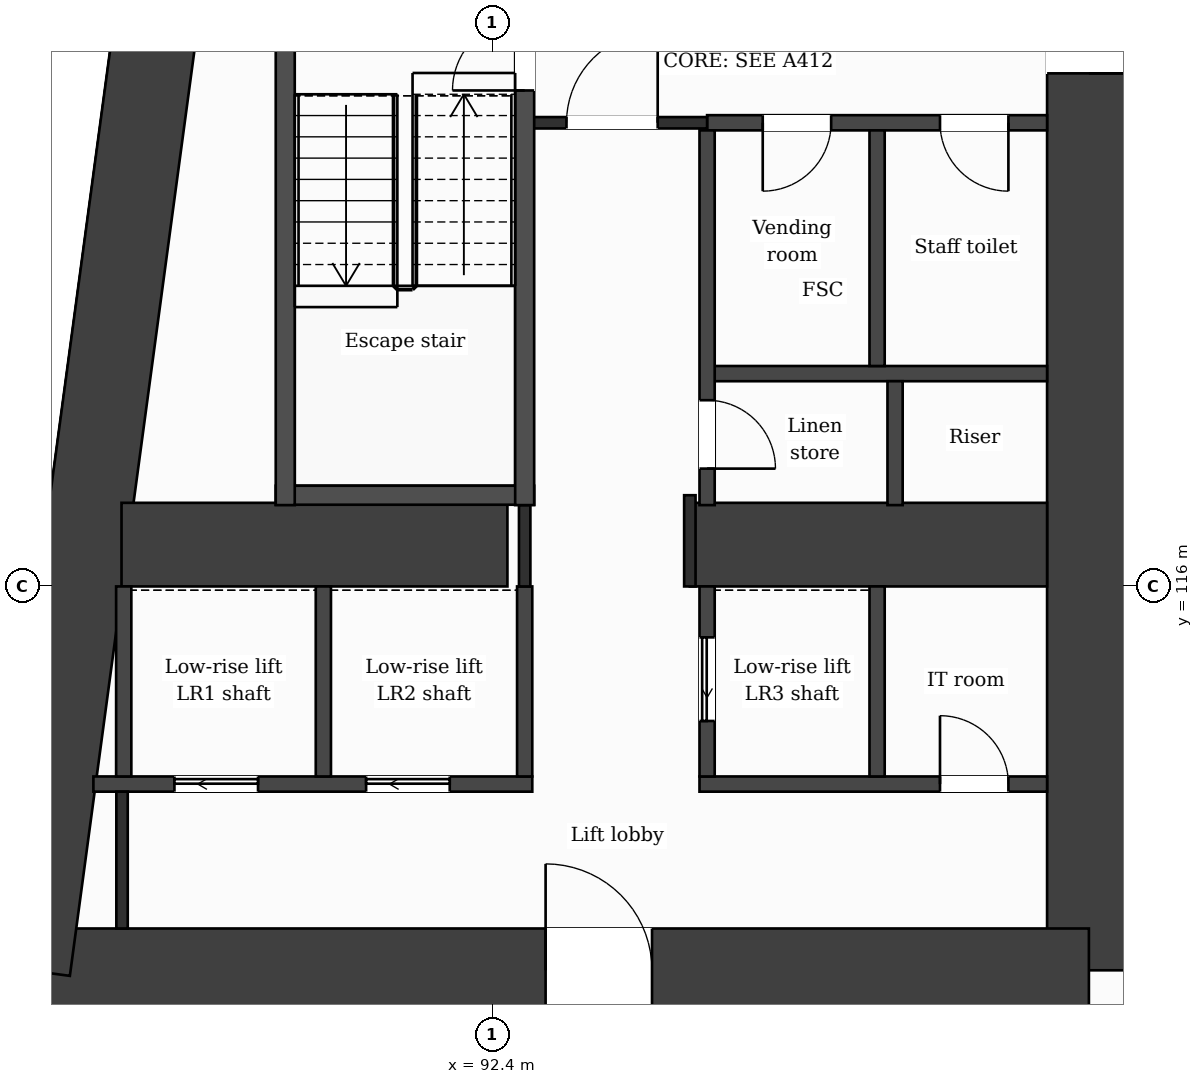
"""IFC4 building model, lengths in metres.
Left out: names, types, materials, properties, quantities, classifications, styles, units other than length and angle.
Written with IfcOpenShell. Run it as: python <this file> out.ifc"""

import sys

from ifc_helpers import new_model, si_unit, direction, frame, frame_2d, origin, place, context, subcontext, project, spatial, rectangle, extrude, element, fill, save


model = new_model("IFC4")
c1 = context("Model", 3, precision=1e-05, world=origin(), true_north=direction((0.0, 1.0)))
c2 = subcontext(c1, "Body", "Model", "MODEL_VIEW")
j1 = project(units=[si_unit("LENGTHUNIT", "METRE"), si_unit("PLANEANGLEUNIT", "RADIAN")], contexts=[c1])
p1 = place(None, origin())
s1 = spatial("IfcSite", under=j1, at=p1, CompositionType="ELEMENT")
p2 = place(p1, origin())
s2 = spatial("IfcBuilding", under=s1, at=p2, CompositionType="ELEMENT")
p3 = place(p2, frame((0.0, 0.0, 56.5)))
s3 = spatial("IfcBuildingStorey", under=s2, at=p3, CompositionType="ELEMENT", Elevation=56.5)
p4 = place(p3, frame((100.25, 131.85, 0.0), z_axis=(0.0, 0.0, 1.0), x_axis=(0.0, -1.0, 0.0)))
e1 = element("IfcWall", 1, at=p4, inside=s3, PredefinedType="SHEAR", context=c2, shape_type="SweptSolid", body=[
    extrude(rectangle(XDim=20.9, YDim=1.1, at=frame_2d((10.45, 0.0))), origin(), (0.0, 0.0, 1.0), 3.5),
])
p5 = place(p4, frame((7.7, 0.0, 0.0)))
e2 = element("IfcOpeningElement", 2, at=p5, cuts=e1, PredefinedType="OPENING", context=c2, shape_type="SweptSolid", body=[
    extrude(rectangle(XDim=1.4, YDim=2.1, at=frame_2d((0.7, 1.05))), frame((0.0, 0.56, 0.0), z_axis=(0.0, -1.0, 0.0), x_axis=(1.0, 0.0, 0.0)), (0.0, 0.0, 1.0), 1.12),
])
p6 = place(p3, frame((100.25, 110.95, 0.0), z_axis=(0.0, 0.0, 1.0), x_axis=(-1.0, 0.0, 0.0)))
e3 = element("IfcWall", 3, at=p6, inside=s3, PredefinedType="SHEAR", context=c2, shape_type="SweptSolid", body=[
    extrude(rectangle(XDim=13.952, YDim=1.1, at=frame_2d((6.976, 0.0))), origin(), (0.0, 0.0, 1.0), 3.5),
])
p7 = place(p6, frame((5.748, 0.0, 0.0)))
e4 = element("IfcOpeningElement", 4, at=p7, cuts=e3, PredefinedType="OPENING", context=c2, shape_type="SweptSolid", body=[
    extrude(rectangle(XDim=1.4, YDim=2.1, at=frame_2d((0.7, 1.05))), frame((0.0, 0.56, 0.0), z_axis=(0.0, -1.0, 0.0), x_axis=(1.0, 0.0, 0.0)), (0.0, 0.0, 1.0), 1.12),
])
p8 = place(p3, frame((86.298, 110.95, 0.0), z_axis=(0.0, 0.0, 1.0), x_axis=(0.133400422634, 0.99106222168, 0.0)))
e5 = element("IfcWall", 5, at=p8, inside=s3, PredefinedType="SHEAR", context=c2, shape_type="SweptSolid", body=[
    extrude(rectangle(XDim=21.089, YDim=1.1, at=frame_2d((10.544, 0.0))), origin(), (0.0, 0.0, 1.0), 3.5),
])
p9 = place(p3, frame((87.523, 116.55, 0.0), z_axis=(0.0, 0.0, 1.0), x_axis=(1.0, 0.0, 0.0)))
e6 = element("IfcWall", 6, at=p9, inside=s3, PredefinedType="SHEAR", context=c2, shape_type="SweptSolid", body=[
    extrude(rectangle(XDim=5.077, YDim=1.1, at=frame_2d((2.539, 0.0))), origin(), (0.0, 0.0, 1.0), 3.5),
])
p10 = place(p3, frame((95.0, 116.55, 0.0), z_axis=(0.0, 0.0, 1.0), x_axis=(1.0, 0.0, 0.0)))
e7 = element("IfcWall", 7, at=p10, inside=s3, PredefinedType="SHEAR", context=c2, shape_type="SweptSolid", body=[
    extrude(rectangle(XDim=4.7, YDim=1.1, at=frame_2d((2.35, 0.0))), origin(), (0.0, 0.0, 1.0), 3.5),
])
p11 = place(p3, frame((87.153, 113.4, 0.0), z_axis=(0.0, 0.0, 1.0), x_axis=(1.0, 0.0, 0.0)))
e8 = element("IfcWall", 8, at=p11, inside=s3, PredefinedType="PARTITIONING", context=c2, shape_type="SweptSolid", body=[
    extrude(rectangle(XDim=5.774, YDim=0.2, at=frame_2d((2.887, 0.0))), origin(), (0.0, 0.0, 1.0), 3.18),
])
p12 = place(p11, frame((1.066, 0.0, 0.0)))
e9 = element("IfcOpeningElement", 9, at=p12, cuts=e8, PredefinedType="OPENING", context=c2, shape_type="SweptSolid", body=[
    extrude(rectangle(XDim=1.1, YDim=2.1, at=frame_2d((0.55, 1.05))), frame((0.0, 0.11, 0.0), z_axis=(0.0, -1.0, 0.0), x_axis=(1.0, 0.0, 0.0)), (0.0, 0.0, 1.0), 0.22),
])
p13 = place(p11, frame((3.588, 0.0, 0.0)))
e10 = element("IfcOpeningElement", 10, at=p13, cuts=e8, PredefinedType="OPENING", context=c2, shape_type="SweptSolid", body=[
    extrude(rectangle(XDim=1.1, YDim=2.1, at=frame_2d((0.55, 1.05))), frame((0.0, 0.11, 0.0), z_axis=(0.0, -1.0, 0.0), x_axis=(1.0, 0.0, 0.0)), (0.0, 0.0, 1.0), 0.22),
])
p14 = place(p3, frame((95.127, 113.4, 0.0), z_axis=(0.0, 0.0, 1.0), x_axis=(1.0, 0.0, 0.0)))
e11 = element("IfcWall", 11, at=p14, inside=s3, PredefinedType="PARTITIONING", context=c2, shape_type="SweptSolid", body=[
    extrude(rectangle(XDim=4.573, YDim=0.2, at=frame_2d((2.287, 0.0))), origin(), (0.0, 0.0, 1.0), 3.18),
])
p15 = place(p14, frame((3.164, 0.0, 0.0)))
e12 = element("IfcOpeningElement", 12, at=p15, cuts=e11, PredefinedType="OPENING", context=c2, shape_type="SweptSolid", body=[
    extrude(rectangle(XDim=0.9, YDim=2.1, at=frame_2d((0.45, 1.05))), frame((0.0, 0.11, 0.0), z_axis=(0.0, -1.0, 0.0), x_axis=(1.0, 0.0, 0.0)), (0.0, 0.0, 1.0), 0.22),
])
p16 = place(p3, frame((89.552, 117.2, 0.0), z_axis=(0.0, 0.0, 1.0), x_axis=(1.0, 0.0, 0.0)))
e13 = element("IfcWall", 13, at=p16, inside=s3, PredefinedType="PARTITIONING", context=c2, shape_type="SweptSolid", body=[
    extrude(rectangle(XDim=3.4, YDim=0.25, at=frame_2d((1.7, 0.0))), origin(), (0.0, 0.0, 1.0), 3.18),
])
p17 = place(p3, frame((95.227, 118.8, 0.0), z_axis=(0.0, 0.0, 1.0), x_axis=(1.0, 0.0, 0.0)))
e14 = element("IfcWall", 14, at=p17, inside=s3, PredefinedType="PARTITIONING", context=c2, shape_type="SweptSolid", body=[
    extrude(rectangle(XDim=4.473, YDim=0.2, at=frame_2d((2.236, 0.0))), origin(), (0.0, 0.0, 1.0), 3.18),
])
p18 = place(p3, frame((95.227, 122.1, 0.0), z_axis=(0.0, 0.0, 1.0), x_axis=(1.0, 0.0, 0.0)))
e15 = element("IfcWall", 15, at=p18, inside=s3, PredefinedType="PARTITIONING", context=c2, shape_type="SweptSolid", body=[
    extrude(rectangle(XDim=4.473, YDim=0.2, at=frame_2d((2.236, 0.0))), origin(), (0.0, 0.0, 1.0), 3.18),
])
p19 = place(p18, frame((0.732, 0.0, 0.0)))
e16 = element("IfcOpeningElement", 16, at=p19, cuts=e15, PredefinedType="OPENING", context=c2, shape_type="SweptSolid", body=[
    extrude(rectangle(XDim=0.9, YDim=2.1, at=frame_2d((0.45, 1.05))), frame((0.0, 0.11, 0.0), z_axis=(0.0, -1.0, 0.0), x_axis=(1.0, 0.0, 0.0)), (0.0, 0.0, 1.0), 0.22),
])
p20 = place(p18, frame((3.064, 0.0, 0.0)))
e17 = element("IfcOpeningElement", 17, at=p20, cuts=e15, PredefinedType="OPENING", context=c2, shape_type="SweptSolid", body=[
    extrude(rectangle(XDim=0.9, YDim=2.1, at=frame_2d((0.45, 1.05))), frame((0.0, 0.11, 0.0), z_axis=(0.0, -1.0, 0.0), x_axis=(1.0, 0.0, 0.0)), (0.0, 0.0, 1.0), 0.22),
])
p21 = place(p3, frame((92.827, 122.1, 0.0), z_axis=(0.0, 0.0, 1.0), x_axis=(1.0, 0.0, 0.0)))
e18 = element("IfcWall", 18, at=p21, inside=s3, PredefinedType="PARTITIONING", context=c2, shape_type="SweptSolid", body=[
    extrude(rectangle(XDim=2.4, YDim=0.15, at=frame_2d((1.2, 0.0))), origin(), (0.0, 0.0, 1.0), 3.18),
])
p22 = place(p21, frame((0.55, 0.0, 0.0)))
e19 = element("IfcOpeningElement", 19, at=p22, cuts=e18, PredefinedType="OPENING", context=c2, shape_type="SweptSolid", body=[
    extrude(rectangle(XDim=1.2, YDim=2.1, at=frame_2d((0.6, 1.05))), frame((0.0, 0.085, 0.0), z_axis=(0.0, -1.0, 0.0), x_axis=(1.0, 0.0, 0.0)), (0.0, 0.0, 1.0), 0.17),
])
p23 = place(p3, frame((87.552, 113.5, 0.0), z_axis=(0.0, 0.0, 1.0), x_axis=(0.0, 1.0, 0.0)))
e20 = element("IfcWall", 20, at=p23, inside=s3, PredefinedType="PARTITIONING", context=c2, shape_type="SweptSolid", body=[
    extrude(rectangle(XDim=2.5, YDim=0.2, at=frame_2d((1.25, 0.0))), origin(), (0.0, 0.0, 1.0), 3.18),
])
p24 = place(p3, frame((87.53, 111.5, 0.0), z_axis=(0.0, 0.0, 1.0), x_axis=(0.0, 1.0, 0.0)))
e21 = element("IfcWall", 21, at=p24, inside=s3, PredefinedType="PARTITIONING", context=c2, shape_type="SweptSolid", body=[
    extrude(rectangle(XDim=1.8, YDim=0.15, at=frame_2d((0.9, 0.0))), origin(), (0.0, 0.0, 1.0), 3.18),
])
p25 = place(p3, frame((89.677, 117.07, 0.0), z_axis=(0.0, 0.0, 1.0), x_axis=(0.0, 1.0, 0.0)))
e22 = element("IfcWall", 22, at=p25, inside=s3, PredefinedType="PARTITIONING", context=c2, shape_type="SweptSolid", body=[
    extrude(rectangle(XDim=6.755, YDim=0.25, at=frame_2d((3.377, 0.0))), origin(), (0.0, 0.0, 1.0), 3.18),
])
for number, where, z_axis, x_axis in (
    (23, (90.178, 113.5, 0.0), (0.0, 0.0, 1.0), (0.0, 1.0, 0.0)),
    (24, (92.827, 113.5, 0.0), (0.0, 0.0, 1.0), (0.0, 1.0, 0.0)),
):
    element("IfcWall", number, at=place(p3, frame(where, z_axis=z_axis, x_axis=x_axis)), inside=s3, PredefinedType="PARTITIONING", context=c2, shape_type="SweptSolid", body=[
        extrude(rectangle(XDim=2.5, YDim=0.2, at=frame_2d((1.25, 0.0))), origin(), (0.0, 0.0, 1.0), 3.18),
    ])
p26 = place(p3, frame((92.827, 116.0, 0.0), z_axis=(0.0, 0.0, 1.0), x_axis=(0.0, 1.0, 0.0)))
e25 = element("IfcWall", 25, at=p26, inside=s3, PredefinedType="PARTITIONING", context=c2, shape_type="SweptSolid", body=[
    extrude(rectangle(XDim=1.07, YDim=0.15, at=frame_2d((0.535, 0.0))), origin(), (0.0, 0.0, 1.0), 3.18),
])
p27 = place(p3, frame((92.827, 117.07, 0.0), z_axis=(0.0, 0.0, 1.0), x_axis=(0.0, 1.0, 0.0)))
e26 = element("IfcWall", 26, at=p27, inside=s3, PredefinedType="PARTITIONING", context=c2, shape_type="SweptSolid", body=[
    extrude(rectangle(XDim=6.755, YDim=0.25, at=frame_2d((3.377, 0.0))), origin(), (0.0, 0.0, 1.0), 3.18),
])
p28 = place(p27, frame((5.455, 0.0, 0.0)))
e27 = element("IfcOpeningElement", 27, at=p28, cuts=e26, PredefinedType="OPENING", context=c2, shape_type="SweptSolid", body=[
    extrude(rectangle(XDim=0.95, YDim=2.1, at=frame_2d((0.475, 1.05))), frame((0.0, 0.135, 0.0), z_axis=(0.0, -1.0, 0.0), x_axis=(1.0, 0.0, 0.0)), (0.0, 0.0, 1.0), 0.27),
])
p29 = place(p3, frame((95.0, 116.0, 0.0), z_axis=(0.0, 0.0, 1.0), x_axis=(0.0, 1.0, 0.0)))
e28 = element("IfcWall", 28, at=p29, inside=s3, PredefinedType="PARTITIONING", context=c2, shape_type="SweptSolid", body=[
    extrude(rectangle(XDim=1.2, YDim=0.15, at=frame_2d((0.6, 0.0))), origin(), (0.0, 0.0, 1.0), 3.18),
])
p30 = place(p3, frame((95.227, 113.5, 0.0), z_axis=(0.0, 0.0, 1.0), x_axis=(0.0, 1.0, 0.0)))
e29 = element("IfcWall", 29, at=p30, inside=s3, PredefinedType="PARTITIONING", context=c2, shape_type="SweptSolid", body=[
    extrude(rectangle(XDim=2.5, YDim=0.2, at=frame_2d((1.25, 0.0))), origin(), (0.0, 0.0, 1.0), 3.18),
])
p31 = place(p30, frame((0.73, 0.0, 0.0)))
e30 = element("IfcOpeningElement", 30, at=p31, cuts=e29, PredefinedType="OPENING", context=c2, shape_type="SweptSolid", body=[
    extrude(rectangle(XDim=1.1, YDim=2.1, at=frame_2d((0.55, 1.05))), frame((0.0, 0.11, 0.0), z_axis=(0.0, -1.0, 0.0), x_axis=(1.0, 0.0, 0.0)), (0.0, 0.0, 1.0), 0.22),
])
p32 = place(p3, frame((95.227, 117.07, 0.0), z_axis=(0.0, 0.0, 1.0), x_axis=(0.0, 1.0, 0.0)))
e31 = element("IfcWall", 31, at=p32, inside=s3, PredefinedType="PARTITIONING", context=c2, shape_type="SweptSolid", body=[
    extrude(rectangle(XDim=4.93, YDim=0.2, at=frame_2d((2.465, 0.0))), origin(), (0.0, 0.0, 1.0), 3.18),
])
p33 = place(p32, frame((0.48, 0.0, 0.0)))
e32 = element("IfcOpeningElement", 32, at=p33, cuts=e31, PredefinedType="OPENING", context=c2, shape_type="SweptSolid", body=[
    extrude(rectangle(XDim=0.9, YDim=2.1, at=frame_2d((0.45, 1.05))), frame((0.0, 0.11, 0.0), z_axis=(0.0, -1.0, 0.0), x_axis=(1.0, 0.0, 0.0)), (0.0, 0.0, 1.0), 0.22),
])
p34 = place(p3, frame((97.463, 113.5, 0.0), z_axis=(0.0, 0.0, 1.0), x_axis=(0.0, 1.0, 0.0)))
e33 = element("IfcWall", 33, at=p34, inside=s3, PredefinedType="PARTITIONING", context=c2, shape_type="SweptSolid", body=[
    extrude(rectangle(XDim=2.5, YDim=0.2, at=frame_2d((1.25, 0.0))), origin(), (0.0, 0.0, 1.0), 3.18),
])
p35 = place(p3, frame((97.463, 118.9, 0.0), z_axis=(0.0, 0.0, 1.0), x_axis=(0.0, 1.0, 0.0)))
e34 = element("IfcWall", 34, at=p35, inside=s3, PredefinedType="PARTITIONING", context=c2, shape_type="SweptSolid", body=[
    extrude(rectangle(XDim=3.1, YDim=0.2, at=frame_2d((1.55, 0.0))), origin(), (0.0, 0.0, 1.0), 3.18),
])
p36 = place(p3, frame((97.7, 117.07, 0.0), z_axis=(0.0, 0.0, 1.0), x_axis=(0.0, 1.0, 0.0)))
e35 = element("IfcWall", 35, at=p36, inside=s3, PredefinedType="PARTITIONING", context=c2, shape_type="SweptSolid", body=[
    extrude(rectangle(XDim=1.63, YDim=0.2, at=frame_2d((0.815, 0.0))), origin(), (0.0, 0.0, 1.0), 3.18),
])
p37 = place(p22, origin())
e36 = element("IfcDoor", 36, at=p37, inside=s3, OperationType="SINGLE_SWING_RIGHT", PredefinedType="DOOR", context=c2, shape_type="SweptSolid", body=[
    extrude(rectangle(XDim=1.2, YDim=2.1, at=frame_2d((0.6, 1.05))), frame((0.0, 0.025, 0.0), z_axis=(0.0, -1.0, 0.0), x_axis=(1.0, 0.0, 0.0)), (0.0, 0.0, 1.0), 0.05),
])
fill(e19, e36)
p38 = place(p19, origin())
e37 = element("IfcDoor", 37, at=p38, inside=s3, OperationType="SINGLE_SWING_LEFT", PredefinedType="DOOR", context=c2, shape_type="SweptSolid", body=[
    extrude(rectangle(XDim=0.9, YDim=2.1, at=frame_2d((0.45, 1.05))), frame((0.0, 0.025, 0.0), z_axis=(0.0, -1.0, 0.0), x_axis=(1.0, 0.0, 0.0)), (0.0, 0.0, 1.0), 0.05),
])
fill(e16, e37)
p39 = place(p20, origin())
e38 = element("IfcDoor", 38, at=p39, inside=s3, OperationType="SINGLE_SWING_RIGHT", PredefinedType="DOOR", context=c2, shape_type="SweptSolid", body=[
    extrude(rectangle(XDim=0.9, YDim=2.1, at=frame_2d((0.45, 1.05))), frame((0.0, 0.025, 0.0), z_axis=(0.0, -1.0, 0.0), x_axis=(1.0, 0.0, 0.0)), (0.0, 0.0, 1.0), 0.05),
])
fill(e17, e38)
p40 = place(p28, origin())
e39 = element("IfcDoor", 39, at=p40, inside=s3, OperationType="SINGLE_SWING_LEFT", PredefinedType="DOOR", context=c2, shape_type="SweptSolid", body=[
    extrude(rectangle(XDim=0.95, YDim=2.1, at=frame_2d((0.475, 1.05))), frame((0.0, 0.025, 0.0), z_axis=(0.0, -1.0, 0.0), x_axis=(1.0, 0.0, 0.0)), (0.0, 0.0, 1.0), 0.05),
])
fill(e27, e39)
p41 = place(p33, origin())
e40 = element("IfcDoor", 40, at=p41, inside=s3, OperationType="SINGLE_SWING_LEFT", PredefinedType="DOOR", context=c2, shape_type="SweptSolid", body=[
    extrude(rectangle(XDim=0.9, YDim=2.1, at=frame_2d((0.45, 1.05))), frame((0.0, 0.025, 0.0), z_axis=(0.0, -1.0, 0.0), x_axis=(1.0, 0.0, 0.0)), (0.0, 0.0, 1.0), 0.05),
])
fill(e32, e40)
p42 = place(p12, origin())
e41 = element("IfcDoor", 41, at=p42, inside=s3, OperationType="SLIDING_TO_LEFT", PredefinedType="DOOR", context=c2, shape_type="SweptSolid", body=[
    extrude(rectangle(XDim=1.1, YDim=2.1, at=frame_2d((0.55, 1.05))), frame((0.0, 0.025, 0.0), z_axis=(0.0, -1.0, 0.0), x_axis=(1.0, 0.0, 0.0)), (0.0, 0.0, 1.0), 0.05),
])
fill(e9, e41)
p43 = place(p13, origin())
e42 = element("IfcDoor", 42, at=p43, inside=s3, OperationType="SLIDING_TO_LEFT", PredefinedType="DOOR", context=c2, shape_type="SweptSolid", body=[
    extrude(rectangle(XDim=1.1, YDim=2.1, at=frame_2d((0.55, 1.05))), frame((0.0, 0.025, 0.0), z_axis=(0.0, -1.0, 0.0), x_axis=(1.0, 0.0, 0.0)), (0.0, 0.0, 1.0), 0.05),
])
fill(e10, e42)
p44 = place(p31, origin())
e43 = element("IfcDoor", 43, at=p44, inside=s3, OperationType="SLIDING_TO_LEFT", PredefinedType="DOOR", context=c2, shape_type="SweptSolid", body=[
    extrude(rectangle(XDim=1.1, YDim=2.1, at=frame_2d((0.55, 1.05))), frame((0.0, 0.025, 0.0), z_axis=(0.0, -1.0, 0.0), x_axis=(1.0, 0.0, 0.0)), (0.0, 0.0, 1.0), 0.05),
])
fill(e30, e43)
p45 = place(p15, origin())
e44 = element("IfcDoor", 44, at=p45, inside=s3, OperationType="SINGLE_SWING_LEFT", PredefinedType="DOOR", context=c2, shape_type="SweptSolid", body=[
    extrude(rectangle(XDim=0.9, YDim=2.1, at=frame_2d((0.45, 1.05))), frame((0.0, 0.025, 0.0), z_axis=(0.0, -1.0, 0.0), x_axis=(1.0, 0.0, 0.0)), (0.0, 0.0, 1.0), 0.05),
])
fill(e12, e44)
p46 = place(p7, origin())
e45 = element("IfcDoor", 45, at=p46, inside=s3, OperationType="SINGLE_SWING_RIGHT", PredefinedType="DOOR", context=c2, shape_type="SweptSolid", body=[
    extrude(rectangle(XDim=1.4, YDim=2.1, at=frame_2d((0.7, 1.05))), frame((0.0, 0.025, 0.0), z_axis=(0.0, -1.0, 0.0), x_axis=(1.0, 0.0, 0.0)), (0.0, 0.0, 1.0), 0.05),
])
fill(e4, e45)
p47 = place(p5, origin())
e46 = element("IfcDoor", 46, at=p47, inside=s3, OperationType="SINGLE_SWING_RIGHT", PredefinedType="DOOR", context=c2, shape_type="SweptSolid", body=[
    extrude(rectangle(XDim=1.4, YDim=2.1, at=frame_2d((0.7, 1.05))), frame((0.0, 0.025, 0.0), z_axis=(0.0, -1.0, 0.0), x_axis=(1.0, 0.0, 0.0)), (0.0, 0.0, 1.0), 0.05),
])
fill(e2, e46)
save(model, sys.argv[1])
